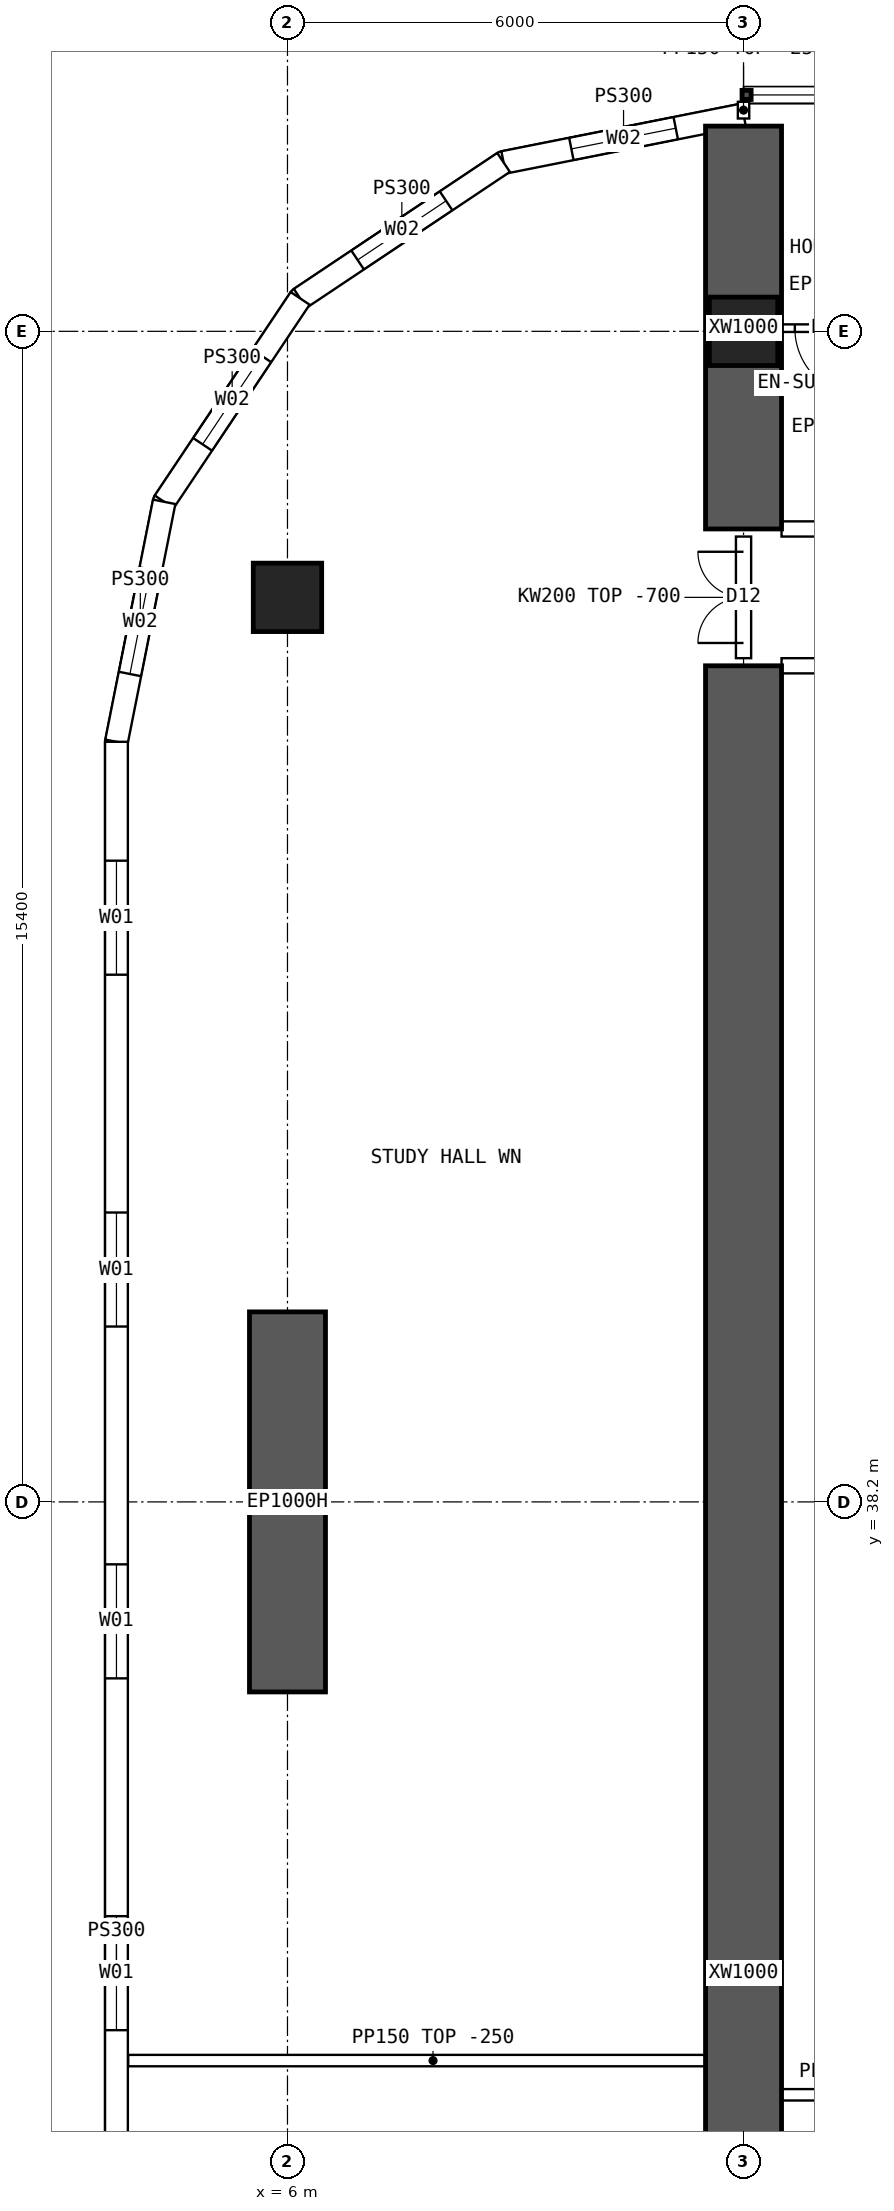
"""IFC4 building model, lengths in metres.
Left out: names, types, materials, properties, quantities, classifications, styles, units other than length and angle.
Written with IfcOpenShell. Run it as: python <this file> out.ifc"""

import sys

from ifc_helpers import new_model, si_unit, direction, frame, frame_2d, origin, origin_2d, place, context, subcontext, project, spatial, polyline, rectangle, hollow_rectangle, outline, extrude, element, fill, save


model = new_model("IFC4")
c1 = context("Model", 3, precision=1e-05, world=origin(), true_north=direction((0.0, 1.0)))
c2 = subcontext(c1, "Body", "Model", "MODEL_VIEW")
j1 = project(units=[si_unit("LENGTHUNIT", "METRE"), si_unit("PLANEANGLEUNIT", "RADIAN")], contexts=[c1])
p1 = place(None, origin())
s1 = spatial("IfcSite", under=j1, at=p1, CompositionType="ELEMENT")
p2 = place(p1, origin())
s2 = spatial("IfcBuilding", under=s1, at=p2, CompositionType="ELEMENT")
p3 = place(p2, frame((0.0, 0.0, 61.45)))
s3 = spatial("IfcBuildingStorey", under=s2, at=p3, CompositionType="ELEMENT", Elevation=61.45)
for number, where, z_axis, x_axis in (
    (1, (12.0, 53.6, 0.0), (0.0, 0.0, 1.0), (1.0, 0.0, 0.0)),
    (2, (6.0, 50.1, 0.0), (0.0, 0.0, 1.0), (1.0, 0.0, 0.0)),
):
    element("IfcColumn", number, at=place(p3, frame(where, z_axis=z_axis, x_axis=x_axis)), inside=s3, PredefinedType="COLUMN", context=c2, shape_type="SweptSolid", body=[
        extrude(hollow_rectangle(XDim=0.9, YDim=0.9, WallThickness=0.09, at=origin_2d()), origin(), (0.0, 0.0, 1.0), 3.75),
    ])
p4 = place(p3, frame((6.0, 35.7, 0.0), z_axis=(0.0, 0.0, 1.0), x_axis=(0.0, 1.0, 0.0)))
e3 = element("IfcWall", 3, at=p4, inside=s3, PredefinedType="SHEAR", context=c2, shape_type="SweptSolid", body=[
    extrude(rectangle(XDim=5.0, YDim=1.0, at=frame_2d((2.5, 0.0))), origin(), (0.0, 0.0, 1.0), 3.75),
])
p5 = place(p3, frame((12.0, 51.0, 0.0), z_axis=(0.0, 0.0, 1.0), x_axis=(0.0, 1.0, 0.0)))
e4 = element("IfcWall", 4, at=p5, inside=s3, PredefinedType="SHEAR", context=c2, shape_type="SweptSolid", body=[
    extrude(rectangle(XDim=5.3, YDim=1.0, at=frame_2d((2.65, 0.0))), origin(), (0.0, 0.0, 1.0), 3.75),
])
p6 = place(p3, frame((12.0, 14.8, 0.0), z_axis=(0.0, 0.0, 1.0), x_axis=(0.0, 1.0, 0.0)))
e5 = element("IfcWall", 5, at=p6, inside=s3, PredefinedType="SHEAR", context=c2, shape_type="SweptSolid", body=[
    extrude(rectangle(XDim=34.4, YDim=1.0, at=frame_2d((17.2, 0.0))), origin(), (0.0, 0.0, 1.0), 3.75),
])
p7 = place(p3, frame((3.75, 48.2, 0.0), z_axis=(0.0, 0.0, 1.0), x_axis=(0.0, -1.0, 0.0)))
e6 = element("IfcWall", 6, at=p7, inside=s3, PredefinedType="SOLIDWALL", context=c2, shape_type="SweptSolid", body=[
    extrude(outline(polyline([(-0.015, -0.15), (32.415, -0.15), (32.385, 0.15), (0.015, 0.15), (-0.015, -0.15)])), origin(), (0.0, 0.0, 1.0), 3.5),
])
p8 = place(p7, frame((1.564, 0.0, 0.9)))
e7 = element("IfcOpeningElement", 7, at=p8, cuts=e6, PredefinedType="OPENING", context=c2, shape_type="SweptSolid", body=[
    extrude(rectangle(XDim=1.5, YDim=2.0, at=frame_2d((0.75, 1.0))), frame((0.0, 0.16, 0.0), z_axis=(0.0, -1.0, 0.0), x_axis=(1.0, 0.0, 0.0)), (0.0, 0.0, 1.0), 0.32),
])
p9 = place(p7, frame((6.193, 0.0, 0.9)))
e8 = element("IfcOpeningElement", 8, at=p9, cuts=e6, PredefinedType="OPENING", context=c2, shape_type="SweptSolid", body=[
    extrude(rectangle(XDim=1.5, YDim=2.0, at=frame_2d((0.75, 1.0))), frame((0.0, 0.16, 0.0), z_axis=(0.0, -1.0, 0.0), x_axis=(1.0, 0.0, 0.0)), (0.0, 0.0, 1.0), 0.32),
])
p10 = place(p7, frame((10.822, 0.0, 0.9)))
e9 = element("IfcOpeningElement", 9, at=p10, cuts=e6, PredefinedType="OPENING", context=c2, shape_type="SweptSolid", body=[
    extrude(rectangle(XDim=1.5, YDim=2.0, at=frame_2d((0.75, 1.0))), frame((0.0, 0.16, 0.0), z_axis=(0.0, -1.0, 0.0), x_axis=(1.0, 0.0, 0.0)), (0.0, 0.0, 1.0), 0.32),
])
p11 = place(p7, frame((15.45, 0.0, 0.9)))
e10 = element("IfcOpeningElement", 10, at=p11, cuts=e6, PredefinedType="OPENING", context=c2, shape_type="SweptSolid", body=[
    extrude(rectangle(XDim=1.5, YDim=2.0, at=frame_2d((0.75, 1.0))), frame((0.0, 0.16, 0.0), z_axis=(0.0, -1.0, 0.0), x_axis=(1.0, 0.0, 0.0)), (0.0, 0.0, 1.0), 0.32),
])
p12 = place(p7, frame((20.079, 0.0, 0.9)))
e11 = element("IfcOpeningElement", 11, at=p12, cuts=e6, PredefinedType="OPENING", context=c2, shape_type="SweptSolid", body=[
    extrude(rectangle(XDim=1.5, YDim=2.0, at=frame_2d((0.75, 1.0))), frame((0.0, 0.16, 0.0), z_axis=(0.0, -1.0, 0.0), x_axis=(1.0, 0.0, 0.0)), (0.0, 0.0, 1.0), 0.32),
])
p13 = place(p7, frame((24.707, 0.0, 0.9)))
e12 = element("IfcOpeningElement", 12, at=p13, cuts=e6, PredefinedType="OPENING", context=c2, shape_type="SweptSolid", body=[
    extrude(rectangle(XDim=1.5, YDim=2.0, at=frame_2d((0.75, 1.0))), frame((0.0, 0.16, 0.0), z_axis=(0.0, -1.0, 0.0), x_axis=(1.0, 0.0, 0.0)), (0.0, 0.0, 1.0), 0.32),
])
p14 = place(p7, frame((29.336, 0.0, 0.9)))
e13 = element("IfcOpeningElement", 13, at=p14, cuts=e6, PredefinedType="OPENING", context=c2, shape_type="SweptSolid", body=[
    extrude(rectangle(XDim=1.5, YDim=2.0, at=frame_2d((0.75, 1.0))), frame((0.0, 0.16, 0.0), z_axis=(0.0, -1.0, 0.0), x_axis=(1.0, 0.0, 0.0)), (0.0, 0.0, 1.0), 0.32),
])
p15 = place(p3, frame((12.0, 56.45, 0.0), z_axis=(0.0, 0.0, 1.0), x_axis=(-0.980787251524, -0.195080412259, 0.0)))
e14 = element("IfcWall", 14, at=p15, inside=s3, PredefinedType="SOLIDWALL", context=c2, shape_type="SweptSolid", body=[
    extrude(outline(polyline([(-0.03, -0.15), (3.249, -0.15), (3.189, 0.15), (0.03, 0.15), (-0.03, -0.15)])), origin(), (0.0, 0.0, 1.0), 3.5),
])
p16 = place(p15, frame((0.909, 0.0, 0.9)))
e15 = element("IfcOpeningElement", 15, at=p16, cuts=e14, PredefinedType="OPENING", context=c2, shape_type="SweptSolid", body=[
    extrude(rectangle(XDim=1.4, YDim=1.8, at=frame_2d((0.7, 0.9))), frame((0.0, 0.16, 0.0), z_axis=(0.0, -1.0, 0.0), x_axis=(1.0, 0.0, 0.0)), (0.0, 0.0, 1.0), 0.32),
])
p17 = place(p3, frame((8.843, 55.822, 0.0), z_axis=(0.0, 0.0, 1.0), x_axis=(-0.831478105043, -0.555557522525, 0.0)))
e16 = element("IfcWall", 16, at=p17, inside=s3, PredefinedType="SOLIDWALL", context=c2, shape_type="SweptSolid", body=[
    extrude(outline(polyline([(-0.03, -0.15), (3.249, -0.15), (3.189, 0.15), (0.03, 0.15), (-0.03, -0.15)])), origin(), (0.0, 0.0, 1.0), 3.5),
])
p18 = place(p17, frame((0.909, 0.0, 0.9)))
e17 = element("IfcOpeningElement", 17, at=p18, cuts=e16, PredefinedType="OPENING", context=c2, shape_type="SweptSolid", body=[
    extrude(rectangle(XDim=1.4, YDim=1.8, at=frame_2d((0.7, 0.9))), frame((0.0, 0.16, 0.0), z_axis=(0.0, -1.0, 0.0), x_axis=(1.0, 0.0, 0.0)), (0.0, 0.0, 1.0), 0.32),
])
p19 = place(p3, frame((6.167, 54.034, 0.0), z_axis=(0.0, 0.0, 1.0), x_axis=(-0.555609954424, -0.831443069936, 0.0)))
e18 = element("IfcWall", 18, at=p19, inside=s3, PredefinedType="SOLIDWALL", context=c2, shape_type="SweptSolid", body=[
    extrude(outline(polyline([(-0.03, -0.15), (3.249, -0.15), (3.189, 0.15), (0.03, 0.15), (-0.03, -0.15)])), origin(), (0.0, 0.0, 1.0), 3.5),
])
p20 = place(p19, frame((0.909, 0.0, 0.9)))
e19 = element("IfcOpeningElement", 19, at=p20, cuts=e18, PredefinedType="OPENING", context=c2, shape_type="SweptSolid", body=[
    extrude(rectangle(XDim=1.4, YDim=1.8, at=frame_2d((0.7, 0.9))), frame((0.0, 0.16, 0.0), z_axis=(0.0, -1.0, 0.0), x_axis=(1.0, 0.0, 0.0)), (0.0, 0.0, 1.0), 0.32),
])
p21 = place(p3, frame((4.378, 51.357, 0.0), z_axis=(0.0, 0.0, 1.0), x_axis=(-0.195065901187, -0.980790137692, 0.0)))
e20 = element("IfcWall", 20, at=p21, inside=s3, PredefinedType="SOLIDWALL", context=c2, shape_type="SweptSolid", body=[
    extrude(outline(polyline([(-0.03, -0.15), (3.234, -0.15), (3.204, 0.15), (0.03, 0.15), (-0.03, -0.15)])), origin(), (0.0, 0.0, 1.0), 3.5),
])
p22 = place(p21, frame((0.909, 0.0, 0.9)))
e21 = element("IfcOpeningElement", 21, at=p22, cuts=e20, PredefinedType="OPENING", context=c2, shape_type="SweptSolid", body=[
    extrude(rectangle(XDim=1.4, YDim=1.8, at=frame_2d((0.7, 0.9))), frame((0.0, 0.16, 0.0), z_axis=(0.0, -1.0, 0.0), x_axis=(1.0, 0.0, 0.0)), (0.0, 0.0, 1.0), 0.32),
])
p23 = place(p3, frame((12.5, 51.0, 0.0), z_axis=(0.0, 0.0, 1.0), x_axis=(1.0, 0.0, 0.0)))
e22 = element("IfcWall", 22, at=p23, inside=s3, PredefinedType="SOLIDWALL", context=c2, shape_type="SweptSolid", body=[
    extrude(outline(polyline([(0.0, 0.0), (5.0, 0.0), (5.0, 3.1), (0.0, 3.1), (0.0, 0.0)])), frame((0.0, 0.1, 0.0), z_axis=(0.0, -1.0, 0.0), x_axis=(1.0, 0.0, 0.0)), (0.0, 0.0, 1.0), 0.2),
])
p24 = place(p23, frame((1.3, 0.0, 0.0)))
e23 = element("IfcOpeningElement", 23, at=p24, cuts=e22, PredefinedType="OPENING", context=c2, shape_type="SweptSolid", body=[
    extrude(rectangle(XDim=0.9, YDim=2.1, at=frame_2d((0.45, 1.05))), frame((0.0, 0.11, 0.0), z_axis=(0.0, -1.0, 0.0), x_axis=(1.0, 0.0, 0.0)), (0.0, 0.0, 1.0), 0.22),
])
p25 = place(p23, frame((2.675, 0.0, 0.0)))
e24 = element("IfcOpeningElement", 24, at=p25, cuts=e22, PredefinedType="OPENING", context=c2, shape_type="SweptSolid", body=[
    extrude(rectangle(XDim=0.9, YDim=2.1, at=frame_2d((0.45, 1.05))), frame((0.0, 0.11, 0.0), z_axis=(0.0, -1.0, 0.0), x_axis=(1.0, 0.0, 0.0)), (0.0, 0.0, 1.0), 0.22),
])
p26 = place(p3, frame((12.5, 49.2, 0.0), z_axis=(0.0, 0.0, 1.0), x_axis=(1.0, 0.0, 0.0)))
e25 = element("IfcWall", 25, at=p26, inside=s3, PredefinedType="SOLIDWALL", context=c2, shape_type="SweptSolid", body=[
    extrude(rectangle(XDim=5.0, YDim=0.2, at=frame_2d((2.5, 0.0))), origin(), (0.0, 0.0, 1.0), 3.5),
])
p27 = place(p26, frame((3.3, 0.0, 0.0)))
e26 = element("IfcOpeningElement", 26, at=p27, cuts=e25, PredefinedType="OPENING", context=c2, shape_type="SweptSolid", body=[
    extrude(rectangle(XDim=1.6, YDim=2.1, at=frame_2d((0.8, 1.05))), frame((0.0, 0.11, 0.0), z_axis=(0.0, -1.0, 0.0), x_axis=(1.0, 0.0, 0.0)), (0.0, 0.0, 1.0), 0.22),
])
p28 = place(p3, frame((12.45, 53.642, 0.0), z_axis=(0.0, 0.0, 1.0), x_axis=(1.0, 0.0, 0.0)))
e27 = element("IfcWall", 27, at=p28, inside=s3, PredefinedType="PARTITIONING", context=c2, shape_type="SweptSolid", body=[
    extrude(outline(polyline([(0.0, 0.0), (1.3, 0.0), (1.3, 3.1), (0.0, 3.1), (0.0, 0.0)])), frame((0.0, 0.05, 0.0), z_axis=(0.0, -1.0, 0.0), x_axis=(1.0, 0.0, 0.0)), (0.0, 0.0, 1.0), 0.1),
])
p29 = place(p28, frame((0.225, 0.0, 0.0)))
e28 = element("IfcOpeningElement", 28, at=p29, cuts=e27, PredefinedType="OPENING", context=c2, shape_type="SweptSolid", body=[
    extrude(rectangle(XDim=0.9, YDim=2.1, at=frame_2d((0.45, 1.05))), frame((0.0, 0.06, 0.0), z_axis=(0.0, -1.0, 0.0), x_axis=(1.0, 0.0, 0.0)), (0.0, 0.0, 1.0), 0.12),
])
p30 = place(p3, frame((12.0, 30.4, 0.0), z_axis=(0.0, 0.0, 1.0), x_axis=(1.0, 0.0, 0.0)))
e29 = element("IfcWall", 29, at=p30, inside=s3, PredefinedType="PARTITIONING", context=c2, shape_type="SweptSolid", body=[
    extrude(rectangle(XDim=3.6, YDim=0.15, at=frame_2d((1.8, 0.0))), origin(), (0.0, 0.0, 1.0), 3.5),
])
p31 = place(p3, frame((3.905, 30.85, 0.0), z_axis=(0.0, 0.0, 1.0), x_axis=(1.0, 0.0, 0.0)))
e30 = element("IfcWall", 30, at=p31, inside=s3, PredefinedType="PARTITIONING", context=c2, shape_type="SweptSolid", body=[
    extrude(outline(polyline([(0.0, 0.0), (8.02, 0.0), (8.02, 3.5), (2.397, 3.5), (2.395, 3.05), (1.797, 3.05), (1.795, 3.5), (0.0, 3.5), (0.0, 0.0)])), frame((0.0, 0.075, 0.0), z_axis=(0.0, -1.0, 0.0), x_axis=(1.0, 0.0, 0.0)), (0.0, 0.0, 1.0), 0.15),
])
p32 = place(p3, frame((12.0, 49.3, 0.0), z_axis=(0.0, 0.0, 1.0), x_axis=(0.0, 1.0, 0.0)))
e31 = element("IfcWall", 31, at=p32, inside=s3, PredefinedType="SOLIDWALL", context=c2, shape_type="SweptSolid", body=[
    extrude(outline(polyline([(0.0, 0.0), (1.6, 0.0), (1.6, 3.05), (0.0, 3.05), (0.0, 0.0)])), frame((0.0, 0.1, 0.0), z_axis=(0.0, -1.0, 0.0), x_axis=(1.0, 0.0, 0.0)), (0.0, 0.0, 1.0), 0.2),
])
p33 = place(p32, frame((0.2, 0.0, 0.0)))
e32 = element("IfcOpeningElement", 32, at=p33, cuts=e31, PredefinedType="OPENING", context=c2, shape_type="SweptSolid", body=[
    extrude(rectangle(XDim=1.2, YDim=2.1, at=frame_2d((0.6, 1.05))), frame((0.0, 0.11, 0.0), z_axis=(0.0, -1.0, 0.0), x_axis=(1.0, 0.0, 0.0)), (0.0, 0.0, 1.0), 0.22),
])
p34 = place(p3, frame((12.0, 56.4, 0.0), z_axis=(0.0, 0.0, 1.0), x_axis=(0.0, 1.0, 0.0)))
e33 = element("IfcWall", 33, at=p34, inside=s3, PredefinedType="PARTITIONING", context=c2, shape_type="SweptSolid", body=[
    extrude(rectangle(XDim=0.22, YDim=0.15, at=frame_2d((0.11, 0.0))), origin(), (0.0, 0.0, 1.0), 3.5),
])
p35 = place(p8, origin())
e34 = element("IfcWindow", 34, at=p35, inside=s3, PartitioningType="SINGLE_PANEL", PredefinedType="WINDOW", context=c2, shape_type="SweptSolid", body=[
    extrude(rectangle(XDim=1.5, YDim=2.0, at=frame_2d((0.75, 1.0))), frame((0.0, 0.03, 0.0), z_axis=(0.0, -1.0, 0.0), x_axis=(1.0, 0.0, 0.0)), (0.0, 0.0, 1.0), 0.06),
])
fill(e7, e34)
p36 = place(p9, origin())
e35 = element("IfcWindow", 35, at=p36, inside=s3, PartitioningType="SINGLE_PANEL", PredefinedType="WINDOW", context=c2, shape_type="SweptSolid", body=[
    extrude(rectangle(XDim=1.5, YDim=2.0, at=frame_2d((0.75, 1.0))), frame((0.0, 0.03, 0.0), z_axis=(0.0, -1.0, 0.0), x_axis=(1.0, 0.0, 0.0)), (0.0, 0.0, 1.0), 0.06),
])
fill(e8, e35)
p37 = place(p10, origin())
e36 = element("IfcWindow", 36, at=p37, inside=s3, PartitioningType="SINGLE_PANEL", PredefinedType="WINDOW", context=c2, shape_type="SweptSolid", body=[
    extrude(rectangle(XDim=1.5, YDim=2.0, at=frame_2d((0.75, 1.0))), frame((0.0, 0.03, 0.0), z_axis=(0.0, -1.0, 0.0), x_axis=(1.0, 0.0, 0.0)), (0.0, 0.0, 1.0), 0.06),
])
fill(e9, e36)
p38 = place(p11, origin())
e37 = element("IfcWindow", 37, at=p38, inside=s3, PartitioningType="SINGLE_PANEL", PredefinedType="WINDOW", context=c2, shape_type="SweptSolid", body=[
    extrude(rectangle(XDim=1.5, YDim=2.0, at=frame_2d((0.75, 1.0))), frame((0.0, 0.03, 0.0), z_axis=(0.0, -1.0, 0.0), x_axis=(1.0, 0.0, 0.0)), (0.0, 0.0, 1.0), 0.06),
])
fill(e10, e37)
p39 = place(p16, origin())
e38 = element("IfcWindow", 38, at=p39, inside=s3, PartitioningType="SINGLE_PANEL", PredefinedType="WINDOW", context=c2, shape_type="SweptSolid", body=[
    extrude(rectangle(XDim=1.4, YDim=1.8, at=frame_2d((0.7, 0.9))), frame((0.0, 0.03, 0.0), z_axis=(0.0, -1.0, 0.0), x_axis=(1.0, 0.0, 0.0)), (0.0, 0.0, 1.0), 0.06),
])
fill(e15, e38)
p40 = place(p18, origin())
e39 = element("IfcWindow", 39, at=p40, inside=s3, PartitioningType="SINGLE_PANEL", PredefinedType="WINDOW", context=c2, shape_type="SweptSolid", body=[
    extrude(rectangle(XDim=1.4, YDim=1.8, at=frame_2d((0.7, 0.9))), frame((0.0, 0.03, 0.0), z_axis=(0.0, -1.0, 0.0), x_axis=(1.0, 0.0, 0.0)), (0.0, 0.0, 1.0), 0.06),
])
fill(e17, e39)
p41 = place(p20, origin())
e40 = element("IfcWindow", 40, at=p41, inside=s3, PartitioningType="SINGLE_PANEL", PredefinedType="WINDOW", context=c2, shape_type="SweptSolid", body=[
    extrude(rectangle(XDim=1.4, YDim=1.8, at=frame_2d((0.7, 0.9))), frame((0.0, 0.03, 0.0), z_axis=(0.0, -1.0, 0.0), x_axis=(1.0, 0.0, 0.0)), (0.0, 0.0, 1.0), 0.06),
])
fill(e19, e40)
p42 = place(p22, origin())
e41 = element("IfcWindow", 41, at=p42, inside=s3, PartitioningType="SINGLE_PANEL", PredefinedType="WINDOW", context=c2, shape_type="SweptSolid", body=[
    extrude(rectangle(XDim=1.4, YDim=1.8, at=frame_2d((0.7, 0.9))), frame((0.0, 0.03, 0.0), z_axis=(0.0, -1.0, 0.0), x_axis=(1.0, 0.0, 0.0)), (0.0, 0.0, 1.0), 0.06),
])
fill(e21, e41)
p43 = place(p29, origin())
e42 = element("IfcDoor", 42, at=p43, inside=s3, OperationType="SINGLE_SWING_RIGHT", PredefinedType="DOOR", context=c2, shape_type="SweptSolid", body=[
    extrude(rectangle(XDim=0.9, YDim=2.1, at=frame_2d((0.45, 1.05))), frame((0.0, 0.025, 0.0), z_axis=(0.0, -1.0, 0.0), x_axis=(1.0, 0.0, 0.0)), (0.0, 0.0, 1.0), 0.05),
])
fill(e28, e42)
p44 = place(p33, origin())
e43 = element("IfcDoor", 43, at=p44, inside=s3, OperationType="DOUBLE_DOOR_SINGLE_SWING", PredefinedType="DOOR", context=c2, shape_type="SweptSolid", body=[
    extrude(rectangle(XDim=1.2, YDim=2.1, at=frame_2d((0.6, 1.05))), frame((0.0, 0.025, 0.0), z_axis=(0.0, -1.0, 0.0), x_axis=(1.0, 0.0, 0.0)), (0.0, 0.0, 1.0), 0.05),
])
fill(e32, e43)
save(model, sys.argv[1])
